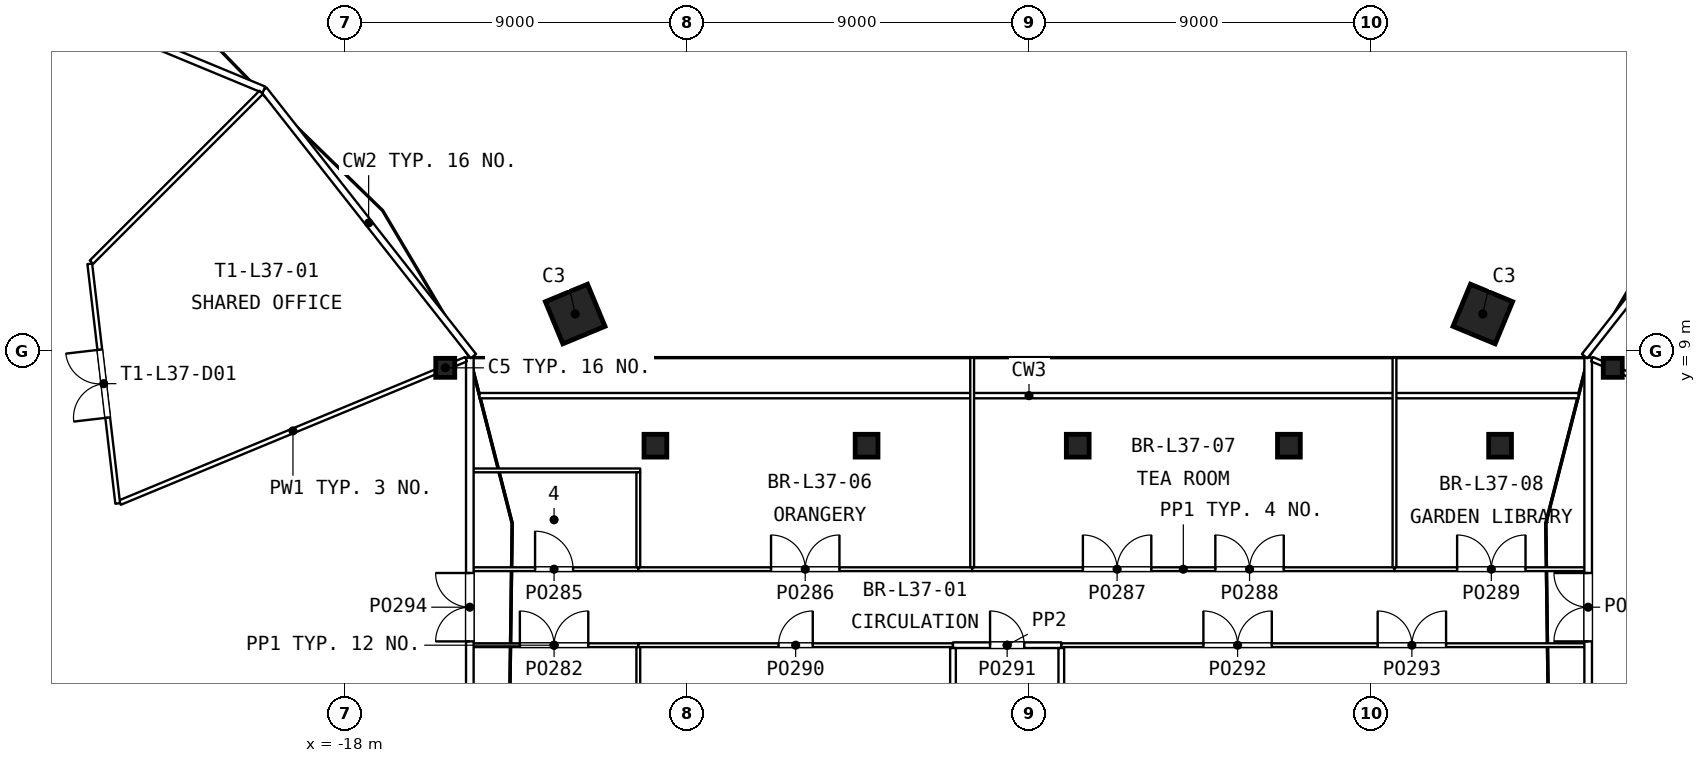
"""IFC4 building model, lengths in metres.
Left out: names, types, materials, properties, quantities, classifications, styles, units other than length and angle.
Written with IfcOpenShell. Run it as: python <this file> out.ifc"""

import sys

from ifc_helpers import new_model, si_unit, direction, frame, frame_2d, origin, origin_2d, place, context, subcontext, project, spatial, rectangle, hollow_rectangle, extrude, element, fill, save


model = new_model("IFC4")
c1 = context("Model", 3, precision=1e-05, world=origin(), true_north=direction((0.0, 1.0)))
c2 = subcontext(c1, "Body", "Model", "MODEL_VIEW")
j1 = project(units=[si_unit("LENGTHUNIT", "METRE"), si_unit("PLANEANGLEUNIT", "RADIAN")], contexts=[c1])
p1 = place(None, origin())
s1 = spatial("IfcSite", under=j1, at=p1, CompositionType="ELEMENT")
p2 = place(p1, origin())
s2 = spatial("IfcBuilding", under=s1, at=p2, CompositionType="ELEMENT")
p3 = place(p2, frame((0.0, 0.0, 130.8)))
s3 = spatial("IfcBuildingStorey", under=s2, at=p3, CompositionType="ELEMENT", Elevation=130.8)
p4 = place(p3, frame((-11.425, 10.179, 0.0), z_axis=(-0.018778670571, -0.007786476489, 0.999793344805), x_axis=(0.707293864185, -0.706876840783, 0.007779566259)))
e1 = element("IfcColumn", 1, at=p4, inside=s3, PredefinedType="COLUMN", context=c2, shape_type="SweptSolid", body=[
    extrude(hollow_rectangle(XDim=1.2, YDim=1.2, WallThickness=0.07, at=origin_2d()), origin(), (0.0, 0.0, 1.0), 30.006),
])
p5 = place(p2, frame((0.0, 0.0, 156.8)))
s4 = spatial("IfcBuildingStorey", under=s2, at=p5, CompositionType="ELEMENT", Elevation=156.8)
p6 = place(p5, frame((-15.361, 8.549, 0.0), z_axis=(0.0, 0.0, 1.0), x_axis=(1.0, 0.0, 0.0)))
e2 = element("IfcColumn", 2, at=p6, inside=s4, PredefinedType="COLUMN", context=c2, shape_type="SweptSolid", body=[
    extrude(hollow_rectangle(XDim=0.5, YDim=0.5, WallThickness=0.03, at=origin_2d()), origin(), (0.0, 0.0, 1.0), 3.9),
])
p7 = place(p3, frame((11.425, 10.179, 0.0), z_axis=(0.018778670571, -0.007786476489, 0.999793344805), x_axis=(-0.707293864185, -0.706876840783, 0.007779566259)))
e3 = element("IfcColumn", 3, at=p7, inside=s3, PredefinedType="COLUMN", context=c2, shape_type="SweptSolid", body=[
    extrude(hollow_rectangle(XDim=1.2, YDim=1.2, WallThickness=0.07, at=origin_2d()), origin(), (0.0, 0.0, 1.0), 30.006),
])
p8 = place(p5, frame((15.361, 8.549, 0.0), z_axis=(0.0, 0.0, 1.0), x_axis=(1.0, 0.0, 0.0)))
e4 = element("IfcColumn", 4, at=p8, inside=s4, PredefinedType="COLUMN", context=c2, shape_type="SweptSolid", body=[
    extrude(hollow_rectangle(XDim=0.5, YDim=0.5, WallThickness=0.03, at=origin_2d()), origin(), (0.0, 0.0, 1.0), 3.9),
])
for number, where, z_axis, x_axis in (
    (5, (-9.831, 6.5, 0.0), (0.0, 0.0, 1.0), (1.0, 0.0, 0.0)),
    (6, (-4.274, 6.5, 0.0), (0.0, 0.0, 1.0), (1.0, 0.0, 0.0)),
    (7, (1.282, 6.5, 0.0), (0.0, 0.0, 1.0), (1.0, 0.0, 0.0)),
    (8, (6.839, 6.5, 0.0), (0.0, 0.0, 1.0), (1.0, 0.0, 0.0)),
    (9, (12.396, 6.5, 0.0), (0.0, 0.0, 1.0), (1.0, 0.0, 0.0)),
):
    element("IfcColumn", number, at=place(p5, frame(where, z_axis=z_axis, x_axis=x_axis)), inside=s4, PredefinedType="COLUMN", context=c2, shape_type="SweptSolid", body=[
        extrude(hollow_rectangle(XDim=0.6, YDim=0.6, WallThickness=0.04, at=origin_2d()), origin(), (0.0, 0.0, 1.0), 3.9),
    ])
p9 = place(p5, frame((-14.814, 8.776, 0.0), z_axis=(0.0, 0.0, 1.0), x_axis=(-0.92387647813, -0.382690806212, 0.0)))
e10 = element("IfcWall", 10, at=p9, inside=s4, PredefinedType="PARTITIONING", context=c2, shape_type="SweptSolid", body=[
    extrude(rectangle(XDim=9.858, YDim=0.125, at=frame_2d((4.929, 0.0))), origin(), (0.0, 0.0, 1.0), 2.2),
])
p10 = place(p5, frame((-20.204, 15.796, 0.0), z_axis=(0.0, 0.0, 1.0), x_axis=(-0.707106781187, -0.707106781187, 0.0)))
e11 = element("IfcWall", 11, at=p10, inside=s4, PredefinedType="PARTITIONING", context=c2, shape_type="SweptSolid", body=[
    extrude(rectangle(XDim=6.317, YDim=0.125, at=frame_2d((3.158, 0.0))), origin(), (0.0, 0.0, 1.0), 2.2),
])
p11 = place(p5, frame((-23.979, 4.979, 0.0), z_axis=(0.0, 0.0, 1.0), x_axis=(-0.115781431912, 0.993274715285, 0.0)))
e12 = element("IfcWall", 12, at=p11, inside=s4, PredefinedType="PARTITIONING", context=c2, shape_type="SweptSolid", body=[
    extrude(rectangle(XDim=6.349, YDim=0.125, at=frame_2d((3.175, 0.0))), origin(), (0.0, 0.0, 1.0), 2.5),
])
p12 = place(p11, frame((2.275, 0.0, 0.0)))
e13 = element("IfcOpeningElement", 13, at=p12, cuts=e12, PredefinedType="OPENING", context=c2, shape_type="SweptSolid", body=[
    extrude(rectangle(XDim=1.8, YDim=2.1, at=frame_2d((0.9, 1.05))), frame((0.0, 0.073, 0.0), z_axis=(0.0, -1.0, 0.0), x_axis=(1.0, 0.0, 0.0)), (0.0, 0.0, 1.0), 0.145),
])
p13 = place(p5, frame((14.814, 8.776, 0.0), z_axis=(0.0, 0.0, 1.0), x_axis=(0.923880680571, -0.382680660691, 0.0)))
e14 = element("IfcWall", 14, at=p13, inside=s4, PredefinedType="PARTITIONING", context=c2, shape_type="SweptSolid", body=[
    extrude(rectangle(XDim=9.878, YDim=0.125, at=frame_2d((4.939, 0.0))), origin(), (0.0, 0.0, 1.0), 2.2),
])
p14 = place(p5, frame((-14.714, 1.25, 0.0), z_axis=(0.0, 0.0, 1.0), x_axis=(1.0, 0.0, 0.0)))
e15 = element("IfcWall", 15, at=p14, inside=s4, PredefinedType="PARTITIONING", context=c2, shape_type="SweptSolid", body=[
    extrude(rectangle(XDim=4.433, YDim=0.1, at=frame_2d((2.217, 0.0))), origin(), (0.0, 0.0, 1.0), 2.9),
])
p15 = place(p14, frame((1.317, 0.0, 0.0)))
e16 = element("IfcOpeningElement", 16, at=p15, cuts=e15, PredefinedType="OPENING", context=c2, shape_type="SweptSolid", body=[
    extrude(rectangle(XDim=1.8, YDim=2.1, at=frame_2d((0.9, 1.05))), frame((0.0, 0.06, 0.0), z_axis=(0.0, -1.0, 0.0), x_axis=(1.0, 0.0, 0.0)), (0.0, 0.0, 1.0), 0.12),
])
p16 = place(p5, frame((-14.714, 3.25, 0.0), z_axis=(0.0, 0.0, 1.0), x_axis=(1.0, 0.0, 0.0)))
e17 = element("IfcWall", 17, at=p16, inside=s4, PredefinedType="PARTITIONING", context=c2, shape_type="SweptSolid", body=[
    extrude(rectangle(XDim=4.433, YDim=0.1, at=frame_2d((2.217, 0.0))), origin(), (0.0, 0.0, 1.0), 2.9),
])
p17 = place(p16, frame((1.717, 0.0, 0.0)))
e18 = element("IfcOpeningElement", 18, at=p17, cuts=e17, PredefinedType="OPENING", context=c2, shape_type="SweptSolid", body=[
    extrude(rectangle(XDim=1.0, YDim=2.1, at=frame_2d((0.5, 1.05))), frame((0.0, 0.06, 0.0), z_axis=(0.0, -1.0, 0.0), x_axis=(1.0, 0.0, 0.0)), (0.0, 0.0, 1.0), 0.12),
])
p18 = place(p5, frame((-10.281, 3.25, 0.0), z_axis=(0.0, 0.0, 1.0), x_axis=(1.0, 0.0, 0.0)))
e19 = element("IfcWall", 19, at=p18, inside=s4, PredefinedType="PARTITIONING", context=c2, shape_type="SweptSolid", body=[
    extrude(rectangle(XDim=8.785, YDim=0.1, at=frame_2d((4.392, 0.0))), origin(), (0.0, 0.0, 1.0), 2.9),
])
p19 = place(p18, frame((3.492, 0.0, 0.0)))
e20 = element("IfcOpeningElement", 20, at=p19, cuts=e19, PredefinedType="OPENING", context=c2, shape_type="SweptSolid", body=[
    extrude(rectangle(XDim=1.8, YDim=2.1, at=frame_2d((0.9, 1.05))), frame((0.0, 0.06, 0.0), z_axis=(0.0, -1.0, 0.0), x_axis=(1.0, 0.0, 0.0)), (0.0, 0.0, 1.0), 0.12),
])
p20 = place(p5, frame((-1.496, 3.25, 0.0), z_axis=(0.0, 0.0, 1.0), x_axis=(1.0, 0.0, 0.0)))
e21 = element("IfcWall", 21, at=p20, inside=s4, PredefinedType="PARTITIONING", context=c2, shape_type="SweptSolid", body=[
    extrude(rectangle(XDim=11.113, YDim=0.1, at=frame_2d((5.557, 0.0))), origin(), (0.0, 0.0, 1.0), 2.9),
])
p21 = place(p20, frame((2.914, 0.0, 0.0)))
e22 = element("IfcOpeningElement", 22, at=p21, cuts=e21, PredefinedType="OPENING", context=c2, shape_type="SweptSolid", body=[
    extrude(rectangle(XDim=1.8, YDim=2.1, at=frame_2d((0.9, 1.05))), frame((0.0, 0.06, 0.0), z_axis=(0.0, -1.0, 0.0), x_axis=(1.0, 0.0, 0.0)), (0.0, 0.0, 1.0), 0.12),
])
p22 = place(p20, frame((6.399, 0.0, 0.0)))
e23 = element("IfcOpeningElement", 23, at=p22, cuts=e21, PredefinedType="OPENING", context=c2, shape_type="SweptSolid", body=[
    extrude(rectangle(XDim=1.8, YDim=2.1, at=frame_2d((0.9, 1.05))), frame((0.0, 0.06, 0.0), z_axis=(0.0, -1.0, 0.0), x_axis=(1.0, 0.0, 0.0)), (0.0, 0.0, 1.0), 0.12),
])
p23 = place(p5, frame((9.617, 3.25, 0.0), z_axis=(0.0, 0.0, 1.0), x_axis=(1.0, 0.0, 0.0)))
e24 = element("IfcWall", 24, at=p23, inside=s4, PredefinedType="PARTITIONING", context=c2, shape_type="SweptSolid", body=[
    extrude(rectangle(XDim=5.097, YDim=0.1, at=frame_2d((2.548, 0.0))), origin(), (0.0, 0.0, 1.0), 2.9),
])
p24 = place(p23, frame((1.648, 0.0, 0.0)))
e25 = element("IfcOpeningElement", 25, at=p24, cuts=e24, PredefinedType="OPENING", context=c2, shape_type="SweptSolid", body=[
    extrude(rectangle(XDim=1.8, YDim=2.1, at=frame_2d((0.9, 1.05))), frame((0.0, 0.06, 0.0), z_axis=(0.0, -1.0, 0.0), x_axis=(1.0, 0.0, 0.0)), (0.0, 0.0, 1.0), 0.12),
])
p25 = place(p5, frame((-10.281, 1.25, 0.0), z_axis=(0.0, 0.0, 1.0), x_axis=(1.0, 0.0, 0.0)))
e26 = element("IfcWall", 26, at=p25, inside=s4, PredefinedType="PARTITIONING", context=c2, shape_type="SweptSolid", body=[
    extrude(rectangle(XDim=8.281, YDim=0.1, at=frame_2d((4.14, 0.0))), origin(), (0.0, 0.0, 1.0), 2.9),
])
p26 = place(p25, frame((3.69, 0.0, 0.0)))
e27 = element("IfcOpeningElement", 27, at=p26, cuts=e26, PredefinedType="OPENING", context=c2, shape_type="SweptSolid", body=[
    extrude(rectangle(XDim=0.9, YDim=2.1, at=frame_2d((0.45, 1.05))), frame((0.0, 0.06, 0.0), z_axis=(0.0, -1.0, 0.0), x_axis=(1.0, 0.0, 0.0)), (0.0, 0.0, 1.0), 0.12),
])
p27 = place(p5, frame((-2.0, 1.25, 0.0), z_axis=(0.0, 0.0, 1.0), x_axis=(1.0, 0.0, 0.0)))
e28 = element("IfcWall", 28, at=p27, inside=s4, PredefinedType="PARTITIONING", context=c2, shape_type="SweptSolid", body=[
    extrude(rectangle(XDim=2.85, YDim=0.15, at=frame_2d((1.425, 0.0))), origin(), (0.0, 0.0, 1.0), 2.9),
])
p28 = place(p27, frame((0.975, 0.0, 0.0)))
e29 = element("IfcOpeningElement", 29, at=p28, cuts=e28, PredefinedType="OPENING", context=c2, shape_type="SweptSolid", body=[
    extrude(rectangle(XDim=0.9, YDim=2.1, at=frame_2d((0.45, 1.05))), frame((0.0, 0.085, 0.0), z_axis=(0.0, -1.0, 0.0), x_axis=(1.0, 0.0, 0.0)), (0.0, 0.0, 1.0), 0.17),
])
p29 = place(p5, frame((0.85, 1.25, 0.0), z_axis=(0.0, 0.0, 1.0), x_axis=(1.0, 0.0, 0.0)))
e30 = element("IfcWall", 30, at=p29, inside=s4, PredefinedType="PARTITIONING", context=c2, shape_type="SweptSolid", body=[
    extrude(rectangle(XDim=13.864, YDim=0.1, at=frame_2d((6.932, 0.0))), origin(), (0.0, 0.0, 1.0), 2.9),
])
p30 = place(p29, frame((3.739, 0.0, 0.0)))
e31 = element("IfcOpeningElement", 31, at=p30, cuts=e30, PredefinedType="OPENING", context=c2, shape_type="SweptSolid", body=[
    extrude(rectangle(XDim=1.8, YDim=2.1, at=frame_2d((0.9, 1.05))), frame((0.0, 0.06, 0.0), z_axis=(0.0, -1.0, 0.0), x_axis=(1.0, 0.0, 0.0)), (0.0, 0.0, 1.0), 0.12),
])
p31 = place(p29, frame((8.325, 0.0, 0.0)))
e32 = element("IfcOpeningElement", 32, at=p31, cuts=e30, PredefinedType="OPENING", context=c2, shape_type="SweptSolid", body=[
    extrude(rectangle(XDim=1.8, YDim=2.1, at=frame_2d((0.9, 1.05))), frame((0.0, 0.06, 0.0), z_axis=(0.0, -1.0, 0.0), x_axis=(1.0, 0.0, 0.0)), (0.0, 0.0, 1.0), 0.12),
])
p32 = place(p5, frame((-10.281, -1.15, 0.0), z_axis=(0.0, 0.0, 1.0), x_axis=(0.0, 1.0, 0.0)))
e33 = element("IfcWall", 33, at=p32, inside=s4, PredefinedType="PARTITIONING", context=c2, shape_type="SweptSolid", body=[
    extrude(rectangle(XDim=2.35, YDim=0.1, at=frame_2d((1.175, 0.0))), origin(), (0.0, 0.0, 1.0), 2.9),
])
p33 = place(p5, frame((-14.714, 5.85, 0.0), z_axis=(0.0, 0.0, 1.0), x_axis=(1.0, 0.0, 0.0)))
e34 = element("IfcWall", 34, at=p33, inside=s4, PredefinedType="PARTITIONING", context=c2, shape_type="SweptSolid", body=[
    extrude(rectangle(XDim=4.483, YDim=0.1, at=frame_2d((2.242, 0.0))), origin(), (0.0, 0.0, 1.0), 2.9),
])
p34 = place(p5, frame((-10.281, 3.3, 0.0), z_axis=(0.0, 0.0, 1.0), x_axis=(0.0, 1.0, 0.0)))
e35 = element("IfcWall", 35, at=p34, inside=s4, PredefinedType="PARTITIONING", context=c2, shape_type="SweptSolid", body=[
    extrude(rectangle(XDim=2.5, YDim=0.1, at=frame_2d((1.25, 0.0))), origin(), (0.0, 0.0, 1.0), 2.9),
])
for number, where, z_axis, x_axis in (
    (36, (-1.496, 3.3, 0.0), (0.0, 0.0, 1.0), (0.0, 1.0, 0.0)),
    (37, (9.617, 3.3, 0.0), (0.0, 0.0, 1.0), (0.0, 1.0, 0.0)),
):
    element("IfcWall", number, at=place(p5, frame(where, z_axis=z_axis, x_axis=x_axis)), inside=s4, PredefinedType="PARTITIONING", context=c2, shape_type="SweptSolid", body=[
        extrude(rectangle(XDim=5.517, YDim=0.1, at=frame_2d((2.758, 0.0))), origin(), (0.0, 0.0, 1.0), 2.9),
    ])
for number, where, z_axis, x_axis in (
    (38, (-2.0, -8.817, 0.0), (0.0, 0.0, 1.0), (0.0, 1.0, 0.0)),
    (39, (0.85, -8.817, 0.0), (0.0, 0.0, 1.0), (0.0, 1.0, 0.0)),
):
    element("IfcWall", number, at=place(p5, frame(where, z_axis=z_axis, x_axis=x_axis)), inside=s4, PredefinedType="PARTITIONING", context=c2, shape_type="SweptSolid", body=[
        extrude(rectangle(XDim=9.992, YDim=0.15, at=frame_2d((4.996, 0.0))), origin(), (0.0, 0.0, 1.0), 2.9),
    ])
p35 = place(p5, frame((-14.714, -8.817, 0.0), z_axis=(0.0, 0.0, 1.0), x_axis=(0.0, 1.0, 0.0)))
e40 = element("IfcWall", 40, at=p35, inside=s4, PredefinedType="PARTITIONING", context=c2, shape_type="SweptSolid", body=[
    extrude(rectangle(XDim=17.634, YDim=0.2, at=frame_2d((8.817, 0.0))), origin(), (0.0, 0.0, 1.0), 3.7),
])
p36 = place(p35, frame((10.167, 0.0, 0.0)))
e41 = element("IfcOpeningElement", 41, at=p36, cuts=e40, PredefinedType="OPENING", context=c2, shape_type="SweptSolid", body=[
    extrude(rectangle(XDim=1.8, YDim=2.1, at=frame_2d((0.9, 1.05))), frame((0.0, 0.11, 0.0), z_axis=(0.0, -1.0, 0.0), x_axis=(1.0, 0.0, 0.0)), (0.0, 0.0, 1.0), 0.22),
])
p37 = place(p5, frame((14.714, -8.817, 0.0), z_axis=(0.0, 0.0, 1.0), x_axis=(0.0, 1.0, 0.0)))
e42 = element("IfcWall", 42, at=p37, inside=s4, PredefinedType="PARTITIONING", context=c2, shape_type="SweptSolid", body=[
    extrude(rectangle(XDim=17.634, YDim=0.2, at=frame_2d((8.817, 0.0))), origin(), (0.0, 0.0, 1.0), 3.7),
])
p38 = place(p37, frame((10.167, 0.0, 0.0)))
e43 = element("IfcOpeningElement", 43, at=p38, cuts=e42, PredefinedType="OPENING", context=c2, shape_type="SweptSolid", body=[
    extrude(rectangle(XDim=1.8, YDim=2.1, at=frame_2d((0.9, 1.05))), frame((0.0, 0.11, 0.0), z_axis=(0.0, -1.0, 0.0), x_axis=(1.0, 0.0, 0.0)), (0.0, 0.0, 1.0), 0.22),
])
p39 = place(p12, origin())
e44 = element("IfcDoor", 44, at=p39, inside=s4, OperationType="DOUBLE_DOOR_DOUBLE_SWING", PredefinedType="DOOR", context=c2, shape_type="SweptSolid", body=[
    extrude(rectangle(XDim=1.8, YDim=2.1, at=frame_2d((0.9, 1.05))), frame((0.0, 0.025, 0.0), z_axis=(0.0, -1.0, 0.0), x_axis=(1.0, 0.0, 0.0)), (0.0, 0.0, 1.0), 0.05),
])
fill(e13, e44)
p40 = place(p15, origin())
e45 = element("IfcDoor", 45, at=p40, inside=s4, OperationType="DOUBLE_DOOR_DOUBLE_SWING", PredefinedType="DOOR", context=c2, shape_type="SweptSolid", body=[
    extrude(rectangle(XDim=1.8, YDim=2.1, at=frame_2d((0.9, 1.05))), frame((0.0, 0.025, 0.0), z_axis=(0.0, -1.0, 0.0), x_axis=(1.0, 0.0, 0.0)), (0.0, 0.0, 1.0), 0.05),
])
fill(e16, e45)
p41 = place(p17, origin())
e46 = element("IfcDoor", 46, at=p41, inside=s4, OperationType="SINGLE_SWING_LEFT", PredefinedType="DOOR", context=c2, shape_type="SweptSolid", body=[
    extrude(rectangle(XDim=1.0, YDim=2.1, at=frame_2d((0.5, 1.05))), frame((0.0, 0.025, 0.0), z_axis=(0.0, -1.0, 0.0), x_axis=(1.0, 0.0, 0.0)), (0.0, 0.0, 1.0), 0.05),
])
fill(e18, e46)
p42 = place(p19, origin())
e47 = element("IfcDoor", 47, at=p42, inside=s4, OperationType="DOUBLE_DOOR_DOUBLE_SWING", PredefinedType="DOOR", context=c2, shape_type="SweptSolid", body=[
    extrude(rectangle(XDim=1.8, YDim=2.1, at=frame_2d((0.9, 1.05))), frame((0.0, 0.025, 0.0), z_axis=(0.0, -1.0, 0.0), x_axis=(1.0, 0.0, 0.0)), (0.0, 0.0, 1.0), 0.05),
])
fill(e20, e47)
p43 = place(p21, origin())
e48 = element("IfcDoor", 48, at=p43, inside=s4, OperationType="DOUBLE_DOOR_DOUBLE_SWING", PredefinedType="DOOR", context=c2, shape_type="SweptSolid", body=[
    extrude(rectangle(XDim=1.8, YDim=2.1, at=frame_2d((0.9, 1.05))), frame((0.0, 0.025, 0.0), z_axis=(0.0, -1.0, 0.0), x_axis=(1.0, 0.0, 0.0)), (0.0, 0.0, 1.0), 0.05),
])
fill(e22, e48)
p44 = place(p22, origin())
e49 = element("IfcDoor", 49, at=p44, inside=s4, OperationType="DOUBLE_DOOR_DOUBLE_SWING", PredefinedType="DOOR", context=c2, shape_type="SweptSolid", body=[
    extrude(rectangle(XDim=1.8, YDim=2.1, at=frame_2d((0.9, 1.05))), frame((0.0, 0.025, 0.0), z_axis=(0.0, -1.0, 0.0), x_axis=(1.0, 0.0, 0.0)), (0.0, 0.0, 1.0), 0.05),
])
fill(e23, e49)
p45 = place(p24, origin())
e50 = element("IfcDoor", 50, at=p45, inside=s4, OperationType="DOUBLE_DOOR_DOUBLE_SWING", PredefinedType="DOOR", context=c2, shape_type="SweptSolid", body=[
    extrude(rectangle(XDim=1.8, YDim=2.1, at=frame_2d((0.9, 1.05))), frame((0.0, 0.025, 0.0), z_axis=(0.0, -1.0, 0.0), x_axis=(1.0, 0.0, 0.0)), (0.0, 0.0, 1.0), 0.05),
])
fill(e25, e50)
p46 = place(p26, origin())
e51 = element("IfcDoor", 51, at=p46, inside=s4, OperationType="SINGLE_SWING_RIGHT", PredefinedType="DOOR", context=c2, shape_type="SweptSolid", body=[
    extrude(rectangle(XDim=0.9, YDim=2.1, at=frame_2d((0.45, 1.05))), frame((0.0, 0.025, 0.0), z_axis=(0.0, -1.0, 0.0), x_axis=(1.0, 0.0, 0.0)), (0.0, 0.0, 1.0), 0.05),
])
fill(e27, e51)
p47 = place(p28, origin())
e52 = element("IfcDoor", 52, at=p47, inside=s4, OperationType="SINGLE_SWING_LEFT", PredefinedType="DOOR", context=c2, shape_type="SweptSolid", body=[
    extrude(rectangle(XDim=0.9, YDim=2.1, at=frame_2d((0.45, 1.05))), frame((0.0, 0.025, 0.0), z_axis=(0.0, -1.0, 0.0), x_axis=(1.0, 0.0, 0.0)), (0.0, 0.0, 1.0), 0.05),
])
fill(e29, e52)
p48 = place(p30, origin())
e53 = element("IfcDoor", 53, at=p48, inside=s4, OperationType="DOUBLE_DOOR_DOUBLE_SWING", PredefinedType="DOOR", context=c2, shape_type="SweptSolid", body=[
    extrude(rectangle(XDim=1.8, YDim=2.1, at=frame_2d((0.9, 1.05))), frame((0.0, 0.025, 0.0), z_axis=(0.0, -1.0, 0.0), x_axis=(1.0, 0.0, 0.0)), (0.0, 0.0, 1.0), 0.05),
])
fill(e31, e53)
p49 = place(p31, origin())
e54 = element("IfcDoor", 54, at=p49, inside=s4, OperationType="DOUBLE_DOOR_DOUBLE_SWING", PredefinedType="DOOR", context=c2, shape_type="SweptSolid", body=[
    extrude(rectangle(XDim=1.8, YDim=2.1, at=frame_2d((0.9, 1.05))), frame((0.0, 0.025, 0.0), z_axis=(0.0, -1.0, 0.0), x_axis=(1.0, 0.0, 0.0)), (0.0, 0.0, 1.0), 0.05),
])
fill(e32, e54)
p50 = place(p36, origin())
e55 = element("IfcDoor", 55, at=p50, inside=s4, OperationType="DOUBLE_DOOR_DOUBLE_SWING", PredefinedType="DOOR", context=c2, shape_type="SweptSolid", body=[
    extrude(rectangle(XDim=1.8, YDim=2.1, at=frame_2d((0.9, 1.05))), frame((0.0, 0.025, 0.0), z_axis=(0.0, -1.0, 0.0), x_axis=(1.0, 0.0, 0.0)), (0.0, 0.0, 1.0), 0.05),
])
fill(e41, e55)
p51 = place(p38, origin())
e56 = element("IfcDoor", 56, at=p51, inside=s4, OperationType="DOUBLE_DOOR_DOUBLE_SWING", PredefinedType="DOOR", context=c2, shape_type="SweptSolid", body=[
    extrude(rectangle(XDim=1.8, YDim=2.1, at=frame_2d((0.9, 1.05))), frame((0.0, 0.025, 0.0), z_axis=(0.0, -1.0, 0.0), x_axis=(1.0, 0.0, 0.0)), (0.0, 0.0, 1.0), 0.05),
])
fill(e43, e56)
save(model, sys.argv[1])
